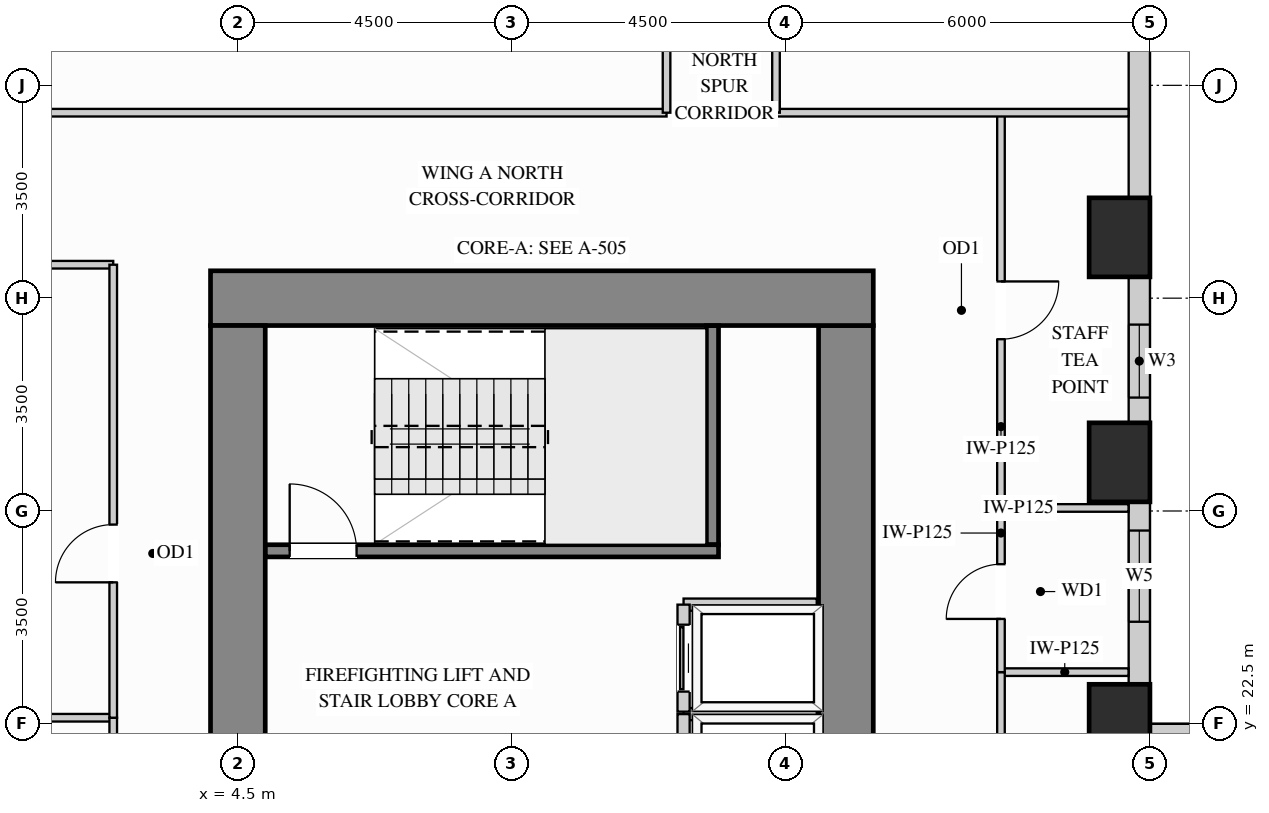
"""IFC4 building model, lengths in metres.
Left out: names, types, materials, properties, quantities, classifications, styles, units other than length and angle.
Written with IfcOpenShell. Run it as: python <this file> out.ifc"""

import sys

from ifc_helpers import new_model, si_unit, direction, frame, frame_2d, origin, origin_2d, place, context, subcontext, project, spatial, rectangle, extrude, source, transform, mapped, element, fill, save


model = new_model("IFC4")
c1 = context("Model", 3, precision=1e-05, world=origin(), true_north=direction((0.0, 1.0)))
c2 = subcontext(c1, "Body", "Model", "MODEL_VIEW")
j1 = project(units=[si_unit("LENGTHUNIT", "METRE"), si_unit("PLANEANGLEUNIT", "RADIAN")], contexts=[c1])
p1 = place(None, origin())
s1 = spatial("IfcSite", under=j1, at=p1, CompositionType="ELEMENT")
p2 = place(p1, origin())
s2 = spatial("IfcBuilding", under=s1, at=p2, CompositionType="ELEMENT")
p3 = place(p2, frame((0.0, 0.0, 47.7)))
s3 = spatial("IfcBuildingStorey", under=s2, at=p3, CompositionType="ELEMENT", Elevation=47.7)
m1 = source(origin(), c2, "Body", "SweptSolid", [
    extrude(rectangle(XDim=1.0, YDim=1.3, at=origin_2d()), origin(), (0.0, 0.0, 1.0), 3.38),
])
for number, where, z_axis, x_axis in (
    (1, (19.0, 22.5, 0.0), (0.0, 0.0, 1.0), (1.0, 0.0, 0.0)),
    (2, (19.0, 26.8, 0.0), (0.0, 0.0, 1.0), (1.0, 0.0, 0.0)),
    (3, (19.0, 30.5, 0.0), (0.0, 0.0, 1.0), (1.0, 0.0, 0.0)),
):
    element("IfcColumn", number, at=place(p3, frame(where, z_axis=z_axis, x_axis=x_axis)), inside=s3, PredefinedType="COLUMN", context=c2, shape_type="MappedRepresentation", body=[
        mapped(m1, transform((0.0, 0.0, 0.0), x_axis=(1.0, 0.0, 0.0), y_axis=(0.0, 1.0, 0.0), z_axis=(0.0, 0.0, 1.0))),
    ])
m2 = source(origin(), c2, "Body", "SweptSolid", [
    extrude(rectangle(XDim=8.17, YDim=0.9, at=frame_2d((4.085, 0.0))), origin(), (0.0, 0.0, 1.0), 3.38),
])
p4 = place(p3, frame((14.5, 20.88, 0.0), z_axis=(0.0, 0.0, 1.0), x_axis=(0.0, 1.0, 0.0)))
e4 = element("IfcWall", 4, at=p4, inside=s3, PredefinedType="SHEAR", context=c2, shape_type="MappedRepresentation", body=[
    mapped(m2, transform((0.0, 0.0, 0.0), x_axis=(1.0, 0.0, 0.0), y_axis=(0.0, 1.0, 0.0), z_axis=(0.0, 0.0, 1.0))),
])
m3 = source(origin(), c2, "Body", "SweptSolid", [
    extrude(rectangle(XDim=10.9, YDim=0.9, at=frame_2d((5.45, 0.0))), origin(), (0.0, 0.0, 1.0), 3.38),
])
p5 = place(p3, frame((4.05, 29.5, 0.0), z_axis=(0.0, 0.0, 1.0), x_axis=(1.0, 0.0, 0.0)))
e5 = element("IfcWall", 5, at=p5, inside=s3, PredefinedType="SHEAR", context=c2, shape_type="MappedRepresentation", body=[
    mapped(m3, transform((0.0, 0.0, 0.0), x_axis=(1.0, 0.0, 0.0), y_axis=(0.0, 1.0, 0.0), z_axis=(0.0, 0.0, 1.0))),
])
m4 = source(origin(), c2, "Body", "SweptSolid", [
    extrude(rectangle(XDim=20.1, YDim=0.9, at=frame_2d((10.05, 0.0))), origin(), (0.0, 0.0, 1.0), 3.38),
])
p6 = place(p3, frame((4.5, 8.95, 0.0), z_axis=(0.0, 0.0, 1.0), x_axis=(0.0, 1.0, 0.0)))
e6 = element("IfcWall", 6, at=p6, inside=s3, PredefinedType="SHEAR", context=c2, shape_type="MappedRepresentation", body=[
    mapped(m4, transform((0.0, 0.0, 0.0), x_axis=(1.0, 0.0, 0.0), y_axis=(0.0, 1.0, 0.0), z_axis=(0.0, 0.0, 1.0))),
])
p7 = place(p3, frame((34.352, 22.325, 0.0), z_axis=(0.0, 0.0, 1.0), x_axis=(-1.0, 0.0, 0.0)))
e7 = element("IfcWall", 7, at=p7, inside=s3, PredefinedType="SOLIDWALL", context=c2, shape_type="SweptSolid", body=[
    extrude(rectangle(XDim=14.854, YDim=0.35, at=frame_2d((7.427, 0.0))), origin(), (0.0, 0.0, 1.0), 3.365),
])
p8 = place(p7, frame((4.058, 0.0, 0.78)))
e8 = element("IfcOpeningElement", 8, at=p8, cuts=e7, PredefinedType="OPENING", context=c2, shape_type="SweptSolid", body=[
    extrude(rectangle(XDim=1.5, YDim=2.0, at=frame_2d((0.75, 1.0))), frame((0.0, 0.185, 0.0), z_axis=(0.0, -1.0, 0.0), x_axis=(1.0, 0.0, 0.0)), (0.0, 0.0, 1.0), 0.37),
])
p9 = place(p7, frame((9.296, 0.0, 0.78)))
e9 = element("IfcOpeningElement", 9, at=p9, cuts=e7, PredefinedType="OPENING", context=c2, shape_type="SweptSolid", body=[
    extrude(rectangle(XDim=1.5, YDim=2.0, at=frame_2d((0.75, 1.0))), frame((0.0, 0.185, 0.0), z_axis=(0.0, -1.0, 0.0), x_axis=(1.0, 0.0, 0.0)), (0.0, 0.0, 1.0), 0.37),
])
p10 = place(p3, frame((19.325, 23.148, 0.0), z_axis=(0.0, 0.0, 1.0), x_axis=(0.0, 1.0, 0.0)))
e10 = element("IfcWall", 10, at=p10, inside=s3, PredefinedType="SOLIDWALL", context=c2, shape_type="SweptSolid", body=[
    extrude(rectangle(XDim=3.004, YDim=0.35, at=frame_2d((1.502, 0.0))), origin(), (0.0, 0.0, 1.0), 2.51),
])
p11 = place(p10, frame((1.031, 0.0, 0.78)))
e11 = element("IfcOpeningElement", 11, at=p11, cuts=e10, PredefinedType="OPENING", context=c2, shape_type="SweptSolid", body=[
    extrude(rectangle(XDim=1.5, YDim=1.55, at=frame_2d((0.75, 0.775))), frame((0.0, 0.185, 0.0), z_axis=(0.0, -1.0, 0.0), x_axis=(1.0, 0.0, 0.0)), (0.0, 0.0, 1.0), 0.37),
])
p12 = place(p3, frame((19.325, 27.448, 0.0), z_axis=(0.0, 0.0, 1.0), x_axis=(0.0, 1.0, 0.0)))
e12 = element("IfcWall", 12, at=p12, inside=s3, PredefinedType="SOLIDWALL", context=c2, shape_type="SweptSolid", body=[
    extrude(rectangle(XDim=2.404, YDim=0.35, at=frame_2d((1.202, 0.0))), origin(), (0.0, 0.0, 1.0), 2.51),
])
p13 = place(p12, frame((0.417, 0.0, 0.78)))
e13 = element("IfcOpeningElement", 13, at=p13, cuts=e12, PredefinedType="OPENING", context=c2, shape_type="SweptSolid", body=[
    extrude(rectangle(XDim=1.2, YDim=1.55, at=frame_2d((0.6, 0.775))), frame((0.0, 0.185, 0.0), z_axis=(0.0, -1.0, 0.0), x_axis=(1.0, 0.0, 0.0)), (0.0, 0.0, 1.0), 0.37),
])
m5 = source(origin(), c2, "Body", "SweptSolid", [
    extrude(rectangle(XDim=3.204, YDim=0.35, at=frame_2d((1.602, 0.0))), origin(), (0.0, 0.0, 1.0), 2.51),
])
p14 = place(p3, frame((19.325, 31.148, 0.0), z_axis=(0.0, 0.0, 1.0), x_axis=(0.0, 1.0, 0.0)))
e14 = element("IfcWall", 14, at=p14, inside=s3, PredefinedType="SOLIDWALL", context=c2, shape_type="MappedRepresentation", body=[
    mapped(m5, transform((0.0, 0.0, 0.0), x_axis=(1.0, 0.0, 0.0), y_axis=(0.0, 1.0, 0.0), z_axis=(0.0, 0.0, 1.0))),
])
m6 = source(origin(), c2, "Body", "SweptSolid", [
    extrude(rectangle(XDim=2.098, YDim=0.125, at=frame_2d((1.049, 0.0))), origin(), (0.0, 0.0, 1.0), 3.365),
])
for number, where, z_axis, x_axis in (
    (15, (17.05, 23.35, 0.0), (0.0, 0.0, 1.0), (1.0, 0.0, 0.0)),
    (16, (17.05, 26.05, 0.0), (0.0, 0.0, 1.0), (1.0, 0.0, 0.0)),
):
    element("IfcWall", number, at=place(p3, frame(where, z_axis=z_axis, x_axis=x_axis)), inside=s3, PredefinedType="PARTITIONING", context=c2, shape_type="MappedRepresentation", body=[
        mapped(m6, transform((0.0, 0.0, 0.0), x_axis=(1.0, 0.0, 0.0), y_axis=(0.0, 1.0, 0.0), z_axis=(0.0, 0.0, 1.0))),
    ])
p15 = place(p3, frame((17.05, 18.2, 0.0), z_axis=(0.0, 0.0, 1.0), x_axis=(0.0, 1.0, 0.0)))
e17 = element("IfcWall", 17, at=p15, inside=s3, PredefinedType="PARTITIONING", context=c2, shape_type="SweptSolid", body=[
    extrude(rectangle(XDim=5.15, YDim=0.125, at=frame_2d((2.575, 0.0))), origin(), (0.0, 0.0, 1.0), 3.365),
])
p16 = place(p15, frame((2.1, 0.0, 0.0)))
e18 = element("IfcOpeningElement", 18, at=p16, cuts=e17, PredefinedType="OPENING", context=c2, shape_type="SweptSolid", body=[
    extrude(rectangle(XDim=0.95, YDim=2.15, at=frame_2d((0.475, 1.075))), frame((0.0, 0.073, 0.0), z_axis=(0.0, -1.0, 0.0), x_axis=(1.0, 0.0, 0.0)), (0.0, 0.0, 1.0), 0.145),
])
p17 = place(p3, frame((17.05, 26.05, 0.0), z_axis=(0.0, 0.0, 1.0), x_axis=(0.0, 1.0, 0.0)))
e19 = element("IfcWall", 19, at=p17, inside=s3, PredefinedType="PARTITIONING", context=c2, shape_type="SweptSolid", body=[
    extrude(rectangle(XDim=6.5, YDim=0.125, at=frame_2d((3.25, 0.0))), origin(), (0.0, 0.0, 1.0), 3.365),
])
p18 = place(p17, frame((2.775, 0.0, 0.0)))
e20 = element("IfcOpeningElement", 20, at=p18, cuts=e19, PredefinedType="OPENING", context=c2, shape_type="SweptSolid", body=[
    extrude(rectangle(XDim=0.95, YDim=2.15, at=frame_2d((0.475, 1.075))), frame((0.0, 0.073, 0.0), z_axis=(0.0, -1.0, 0.0), x_axis=(1.0, 0.0, 0.0)), (0.0, 0.0, 1.0), 0.145),
])
p19 = place(p3, frame((17.05, 23.35, 0.0), z_axis=(0.0, 0.0, 1.0), x_axis=(0.0, 1.0, 0.0)))
e21 = element("IfcWall", 21, at=p19, inside=s3, PredefinedType="PARTITIONING", context=c2, shape_type="SweptSolid", body=[
    extrude(rectangle(XDim=2.7, YDim=0.125, at=frame_2d((1.35, 0.0))), origin(), (0.0, 0.0, 1.0), 3.365),
])
p20 = place(p19, frame((0.875, 0.0, 0.0)))
e22 = element("IfcOpeningElement", 22, at=p20, cuts=e21, PredefinedType="OPENING", context=c2, shape_type="SweptSolid", body=[
    extrude(rectangle(XDim=0.9, YDim=2.15, at=frame_2d((0.45, 1.075))), frame((0.0, 0.073, 0.0), z_axis=(0.0, -1.0, 0.0), x_axis=(1.0, 0.0, 0.0)), (0.0, 0.0, 1.0), 0.145),
])
m7 = source(origin(), c2, "Body", "SweptSolid", [
    extrude(rectangle(XDim=5.798, YDim=0.125, at=frame_2d((2.899, 0.0))), origin(), (0.0, 0.0, 1.0), 3.365),
])
p21 = place(p3, frame((13.35, 32.55, 0.0), z_axis=(0.0, 0.0, 1.0), x_axis=(1.0, 0.0, 0.0)))
e23 = element("IfcWall", 23, at=p21, inside=s3, PredefinedType="PARTITIONING", context=c2, shape_type="MappedRepresentation", body=[
    mapped(m7, transform((0.0, 0.0, 0.0), x_axis=(1.0, 0.0, 0.0), y_axis=(0.0, 1.0, 0.0), z_axis=(0.0, 0.0, 1.0))),
])
m8 = source(origin(), c2, "Body", "SweptSolid", [
    extrude(rectangle(XDim=11.198, YDim=0.125, at=frame_2d((5.599, 0.0))), origin(), (0.0, 0.0, 1.0), 3.365),
])
p22 = place(p3, frame((0.352, 32.55, 0.0), z_axis=(0.0, 0.0, 1.0), x_axis=(1.0, 0.0, 0.0)))
e24 = element("IfcWall", 24, at=p22, inside=s3, PredefinedType="PARTITIONING", context=c2, shape_type="MappedRepresentation", body=[
    mapped(m8, transform((0.0, 0.0, 0.0), x_axis=(1.0, 0.0, 0.0), y_axis=(0.0, 1.0, 0.0), z_axis=(0.0, 0.0, 1.0))),
])
m9 = source(origin(), c2, "Body", "SweptSolid", [
    extrude(rectangle(XDim=1.19, YDim=0.125, at=frame_2d((0.595, 0.0))), origin(), (0.0, 0.0, 1.0), 3.365),
])
p23 = place(p3, frame((1.26, 30.05, 0.0), z_axis=(0.0, 0.0, 1.0), x_axis=(1.0, 0.0, 0.0)))
e25 = element("IfcWall", 25, at=p23, inside=s3, PredefinedType="PARTITIONING", context=c2, shape_type="MappedRepresentation", body=[
    mapped(m9, transform((0.0, 0.0, 0.0), x_axis=(1.0, 0.0, 0.0), y_axis=(0.0, 1.0, 0.0), z_axis=(0.0, 0.0, 1.0))),
])
p24 = place(p3, frame((13.35, 32.55, 0.0), z_axis=(0.0, 0.0, 1.0), x_axis=(0.0, 1.0, 0.0)))
e26 = element("IfcWall", 26, at=p24, inside=s3, PredefinedType="PARTITIONING", context=c2, shape_type="SweptSolid", body=[
    extrude(rectangle(XDim=7.202, YDim=0.125, at=frame_2d((3.601, 0.0))), origin(), (0.0, 0.0, 1.0), 3.365),
])
p25 = place(p24, frame((3.126, 0.0, 0.0)))
e27 = element("IfcOpeningElement", 27, at=p25, cuts=e26, PredefinedType="OPENING", context=c2, shape_type="SweptSolid", body=[
    extrude(rectangle(XDim=0.95, YDim=2.15, at=frame_2d((0.475, 1.075))), frame((0.0, 0.073, 0.0), z_axis=(0.0, -1.0, 0.0), x_axis=(1.0, 0.0, 0.0)), (0.0, 0.0, 1.0), 0.145),
])
p26 = place(p3, frame((11.55, 32.55, 0.0), z_axis=(0.0, 0.0, 1.0), x_axis=(0.0, 1.0, 0.0)))
e28 = element("IfcWall", 28, at=p26, inside=s3, PredefinedType="PARTITIONING", context=c2, shape_type="SweptSolid", body=[
    extrude(rectangle(XDim=4.847, YDim=0.125, at=frame_2d((2.423, 0.0))), origin(), (0.0, 0.0, 1.0), 3.365),
])
p27 = place(p26, frame((1.948, 0.0, 0.0)))
e29 = element("IfcOpeningElement", 29, at=p27, cuts=e28, PredefinedType="OPENING", context=c2, shape_type="SweptSolid", body=[
    extrude(rectangle(XDim=0.95, YDim=2.15, at=frame_2d((0.475, 1.075))), frame((0.0, 0.073, 0.0), z_axis=(0.0, -1.0, 0.0), x_axis=(1.0, 0.0, 0.0)), (0.0, 0.0, 1.0), 0.145),
])
p28 = place(p3, frame((1.26, 22.6, 0.0), z_axis=(0.0, 0.0, 1.0), x_axis=(1.0, 0.0, 0.0)))
e30 = element("IfcWall", 30, at=p28, inside=s3, PredefinedType="PARTITIONING", context=c2, shape_type="MappedRepresentation", body=[
    mapped(m9, transform((0.0, 0.0, 0.0), x_axis=(1.0, 0.0, 0.0), y_axis=(0.0, 1.0, 0.0), z_axis=(0.0, 0.0, 1.0))),
])
p29 = place(p3, frame((2.45, 15.1, 0.0), z_axis=(0.0, 0.0, 1.0), x_axis=(0.0, 1.0, 0.0)))
e31 = element("IfcWall", 31, at=p29, inside=s3, PredefinedType="PARTITIONING", context=c2, shape_type="SweptSolid", body=[
    extrude(rectangle(XDim=7.5, YDim=0.125, at=frame_2d((3.75, 0.0))), origin(), (0.0, 0.0, 1.0), 3.365),
])
p30 = place(p29, frame((4.1, 0.0, 0.0)))
e32 = element("IfcOpeningElement", 32, at=p30, cuts=e31, PredefinedType="OPENING", context=c2, shape_type="SweptSolid", body=[
    extrude(rectangle(XDim=0.95, YDim=2.15, at=frame_2d((0.475, 1.075))), frame((0.0, 0.073, 0.0), z_axis=(0.0, -1.0, 0.0), x_axis=(1.0, 0.0, 0.0)), (0.0, 0.0, 1.0), 0.145),
])
p31 = place(p3, frame((2.45, 22.6, 0.0), z_axis=(0.0, 0.0, 1.0), x_axis=(0.0, 1.0, 0.0)))
e33 = element("IfcWall", 33, at=p31, inside=s3, PredefinedType="PARTITIONING", context=c2, shape_type="SweptSolid", body=[
    extrude(rectangle(XDim=7.45, YDim=0.125, at=frame_2d((3.725, 0.0))), origin(), (0.0, 0.0, 1.0), 3.365),
])
p32 = place(p31, frame((2.227, 0.0, 0.0)))
e34 = element("IfcOpeningElement", 34, at=p32, cuts=e33, PredefinedType="OPENING", context=c2, shape_type="SweptSolid", body=[
    extrude(rectangle(XDim=0.95, YDim=2.15, at=frame_2d((0.475, 1.075))), frame((0.0, 0.073, 0.0), z_axis=(0.0, -1.0, 0.0), x_axis=(1.0, 0.0, 0.0)), (0.0, 0.0, 1.0), 0.145),
])
m10 = source(origin(), c2, "Body", "SweptSolid", [
    extrude(rectangle(XDim=2.19, YDim=0.2, at=frame_2d((1.095, 0.0))), origin(), (0.0, 0.0, 1.0), 3.365),
])
p33 = place(p3, frame((11.83, 22.66, 0.0), z_axis=(0.0, 0.0, 1.0), x_axis=(1.0, 0.0, 0.0)))
e35 = element("IfcWall", 35, at=p33, inside=s3, PredefinedType="PARTITIONING", context=c2, shape_type="MappedRepresentation", body=[
    mapped(m10, transform((0.0, 0.0, 0.0), x_axis=(1.0, 0.0, 0.0), y_axis=(0.0, 1.0, 0.0), z_axis=(0.0, 0.0, 1.0))),
])
p34 = place(p3, frame((11.83, 20.9, 0.0), z_axis=(0.0, 0.0, 1.0), x_axis=(0.0, 1.0, 0.0)))
e36 = element("IfcWall", 36, at=p34, inside=s3, PredefinedType="PARTITIONING", context=c2, shape_type="SweptSolid", body=[
    extrude(rectangle(XDim=1.76, YDim=0.2, at=frame_2d((0.88, 0.0))), origin(), (0.0, 0.0, 1.0), 3.365),
])
p35 = place(p34, frame((0.33, 0.0, 0.0)))
e37 = element("IfcOpeningElement", 37, at=p35, cuts=e36, PredefinedType="OPENING", context=c2, shape_type="SweptSolid", body=[
    extrude(rectangle(XDim=1.1, YDim=2.2, at=frame_2d((0.55, 1.1))), frame((0.0, 0.11, 0.0), z_axis=(0.0, -1.0, 0.0), x_axis=(1.0, 0.0, 0.0)), (0.0, 0.0, 1.0), 0.22),
])
p36 = place(p3, frame((11.83, 24.46, 0.0), z_axis=(0.0, 0.0, 1.0), x_axis=(1.0, 0.0, 0.0)))
e38 = element("IfcWall", 38, at=p36, inside=s3, PredefinedType="PARTITIONING", context=c2, shape_type="MappedRepresentation", body=[
    mapped(m10, transform((0.0, 0.0, 0.0), x_axis=(1.0, 0.0, 0.0), y_axis=(0.0, 1.0, 0.0), z_axis=(0.0, 0.0, 1.0))),
])
p37 = place(p3, frame((11.83, 22.7, 0.0), z_axis=(0.0, 0.0, 1.0), x_axis=(0.0, 1.0, 0.0)))
e39 = element("IfcWall", 39, at=p37, inside=s3, PredefinedType="PARTITIONING", context=c2, shape_type="SweptSolid", body=[
    extrude(rectangle(XDim=1.76, YDim=0.2, at=frame_2d((0.88, 0.0))), origin(), (0.0, 0.0, 1.0), 3.365),
])
p38 = place(p37, frame((0.33, 0.0, 0.0)))
e40 = element("IfcOpeningElement", 40, at=p38, cuts=e39, PredefinedType="OPENING", context=c2, shape_type="SweptSolid", body=[
    extrude(rectangle(XDim=1.1, YDim=2.2, at=frame_2d((0.55, 1.1))), frame((0.0, 0.11, 0.0), z_axis=(0.0, -1.0, 0.0), x_axis=(1.0, 0.0, 0.0)), (0.0, 0.0, 1.0), 0.22),
])
m11 = source(origin(), c2, "Body", "SweptSolid", [
    extrude(rectangle(XDim=3.603, YDim=0.2, at=frame_2d((1.802, 0.0))), origin(), (0.0, 0.0, 1.0), 3.38),
])
p39 = place(p3, frame((12.305, 25.445, 0.0), z_axis=(0.0, 0.0, 1.0), x_axis=(0.0, 1.0, 0.0)))
e41 = element("IfcWall", 41, at=p39, inside=s3, PredefinedType="SHEAR", context=c2, shape_type="MappedRepresentation", body=[
    mapped(m11, transform((0.0, 0.0, 0.0), x_axis=(1.0, 0.0, 0.0), y_axis=(0.0, 1.0, 0.0), z_axis=(0.0, 0.0, 1.0))),
])
p40 = place(p3, frame((4.952, 25.345, 0.0), z_axis=(0.0, 0.0, 1.0), x_axis=(1.0, 0.0, 0.0)))
e42 = element("IfcWall", 42, at=p40, inside=s3, PredefinedType="SHEAR", context=c2, shape_type="SweptSolid", body=[
    extrude(rectangle(XDim=7.453, YDim=0.2, at=frame_2d((3.727, 0.0))), origin(), (0.0, 0.0, 1.0), 3.38),
])
p41 = place(p40, frame((0.4, 0.0, 0.0)))
e43 = element("IfcOpeningElement", 43, at=p41, cuts=e42, PredefinedType="OPENING", context=c2, shape_type="SweptSolid", body=[
    extrude(rectangle(XDim=1.1, YDim=2.15, at=frame_2d((0.55, 1.075))), frame((0.0, 0.11, 0.0), z_axis=(0.0, -1.0, 0.0), x_axis=(1.0, 0.0, 0.0)), (0.0, 0.0, 1.0), 0.22),
])
m12 = source(origin(), c2, "Body", "SweptSolid", [
    extrude(rectangle(XDim=1.1, YDim=2.2, at=frame_2d((0.55, 1.1))), frame((0.0, 0.025, 0.0), z_axis=(0.0, -1.0, 0.0), x_axis=(1.0, 0.0, 0.0)), (0.0, 0.0, 1.0), 0.05),
])
p42 = place(p38, origin())
e44 = element("IfcDoor", 44, at=p42, inside=s3, OperationType="SLIDING_TO_LEFT", PredefinedType="DOOR", context=c2, shape_type="MappedRepresentation", body=[
    mapped(m12, transform((0.0, 0.0, 0.0), x_axis=(1.0, 0.0, 0.0), y_axis=(0.0, 1.0, 0.0), z_axis=(0.0, 0.0, 1.0))),
])
fill(e40, e44)
m13 = source(origin(), c2, "Body", "SweptSolid", [
    extrude(rectangle(XDim=0.95, YDim=2.15, at=frame_2d((0.475, 1.075))), frame((0.0, 0.025, 0.0), z_axis=(0.0, -1.0, 0.0), x_axis=(1.0, 0.0, 0.0)), (0.0, 0.0, 1.0), 0.05),
])
p43 = place(p18, origin())
e45 = element("IfcDoor", 45, at=p43, inside=s3, OperationType="SINGLE_SWING_RIGHT", PredefinedType="DOOR", context=c2, shape_type="MappedRepresentation", body=[
    mapped(m13, transform((0.0, 0.0, 0.0), x_axis=(1.0, 0.0, 0.0), y_axis=(0.0, 1.0, 0.0), z_axis=(0.0, 0.0, 1.0))),
])
fill(e20, e45)
p44 = place(p32, origin())
e46 = element("IfcDoor", 46, at=p44, inside=s3, OperationType="SINGLE_SWING_LEFT", PredefinedType="DOOR", context=c2, shape_type="MappedRepresentation", body=[
    mapped(m13, transform((0.0, 0.0, 0.0), x_axis=(1.0, 0.0, 0.0), y_axis=(0.0, 1.0, 0.0), z_axis=(0.0, 0.0, 1.0))),
])
fill(e34, e46)
m14 = source(origin(), c2, "Body", "SweptSolid", [
    extrude(rectangle(XDim=1.1, YDim=2.15, at=frame_2d((0.55, 1.075))), frame((0.0, 0.025, 0.0), z_axis=(0.0, -1.0, 0.0), x_axis=(1.0, 0.0, 0.0)), (0.0, 0.0, 1.0), 0.05),
])
p45 = place(p41, origin())
e47 = element("IfcDoor", 47, at=p45, inside=s3, OperationType="SINGLE_SWING_LEFT", PredefinedType="DOOR", context=c2, shape_type="MappedRepresentation", body=[
    mapped(m14, transform((0.0, 0.0, 0.0), x_axis=(1.0, 0.0, 0.0), y_axis=(0.0, 1.0, 0.0), z_axis=(0.0, 0.0, 1.0))),
])
fill(e43, e47)
m15 = source(origin(), c2, "Body", "SweptSolid", [
    extrude(rectangle(XDim=0.9, YDim=2.15, at=frame_2d((0.45, 1.075))), frame((0.0, 0.025, 0.0), z_axis=(0.0, -1.0, 0.0), x_axis=(1.0, 0.0, 0.0)), (0.0, 0.0, 1.0), 0.05),
])
p46 = place(p20, origin())
e48 = element("IfcDoor", 48, at=p46, inside=s3, OperationType="SINGLE_SWING_LEFT", PredefinedType="DOOR", context=c2, shape_type="MappedRepresentation", body=[
    mapped(m15, transform((0.0, 0.0, 0.0), x_axis=(1.0, 0.0, 0.0), y_axis=(0.0, 1.0, 0.0), z_axis=(0.0, 0.0, 1.0))),
])
fill(e22, e48)
m16 = source(origin(), c2, "Body", "SweptSolid", [
    extrude(rectangle(XDim=1.2, YDim=1.55, at=frame_2d((0.6, 0.775))), frame((0.0, 0.03, 0.0), z_axis=(0.0, -1.0, 0.0), x_axis=(1.0, 0.0, 0.0)), (0.0, 0.0, 1.0), 0.06),
])
p47 = place(p13, origin())
e49 = element("IfcWindow", 49, at=p47, inside=s3, PartitioningType="SINGLE_PANEL", PredefinedType="WINDOW", context=c2, shape_type="MappedRepresentation", body=[
    mapped(m16, transform((0.0, 0.0, 0.0), x_axis=(1.0, 0.0, 0.0), y_axis=(0.0, 1.0, 0.0), z_axis=(0.0, 0.0, 1.0))),
])
fill(e13, e49)
m17 = source(origin(), c2, "Body", "SweptSolid", [
    extrude(rectangle(XDim=1.5, YDim=1.55, at=frame_2d((0.75, 0.775))), frame((0.0, 0.03, 0.0), z_axis=(0.0, -1.0, 0.0), x_axis=(1.0, 0.0, 0.0)), (0.0, 0.0, 1.0), 0.06),
])
p48 = place(p11, origin())
e50 = element("IfcWindow", 50, at=p48, inside=s3, PartitioningType="SINGLE_PANEL", PredefinedType="WINDOW", context=c2, shape_type="MappedRepresentation", body=[
    mapped(m17, transform((0.0, 0.0, 0.0), x_axis=(1.0, 0.0, 0.0), y_axis=(0.0, 1.0, 0.0), z_axis=(0.0, 0.0, 1.0))),
])
fill(e11, e50)
save(model, sys.argv[1])
